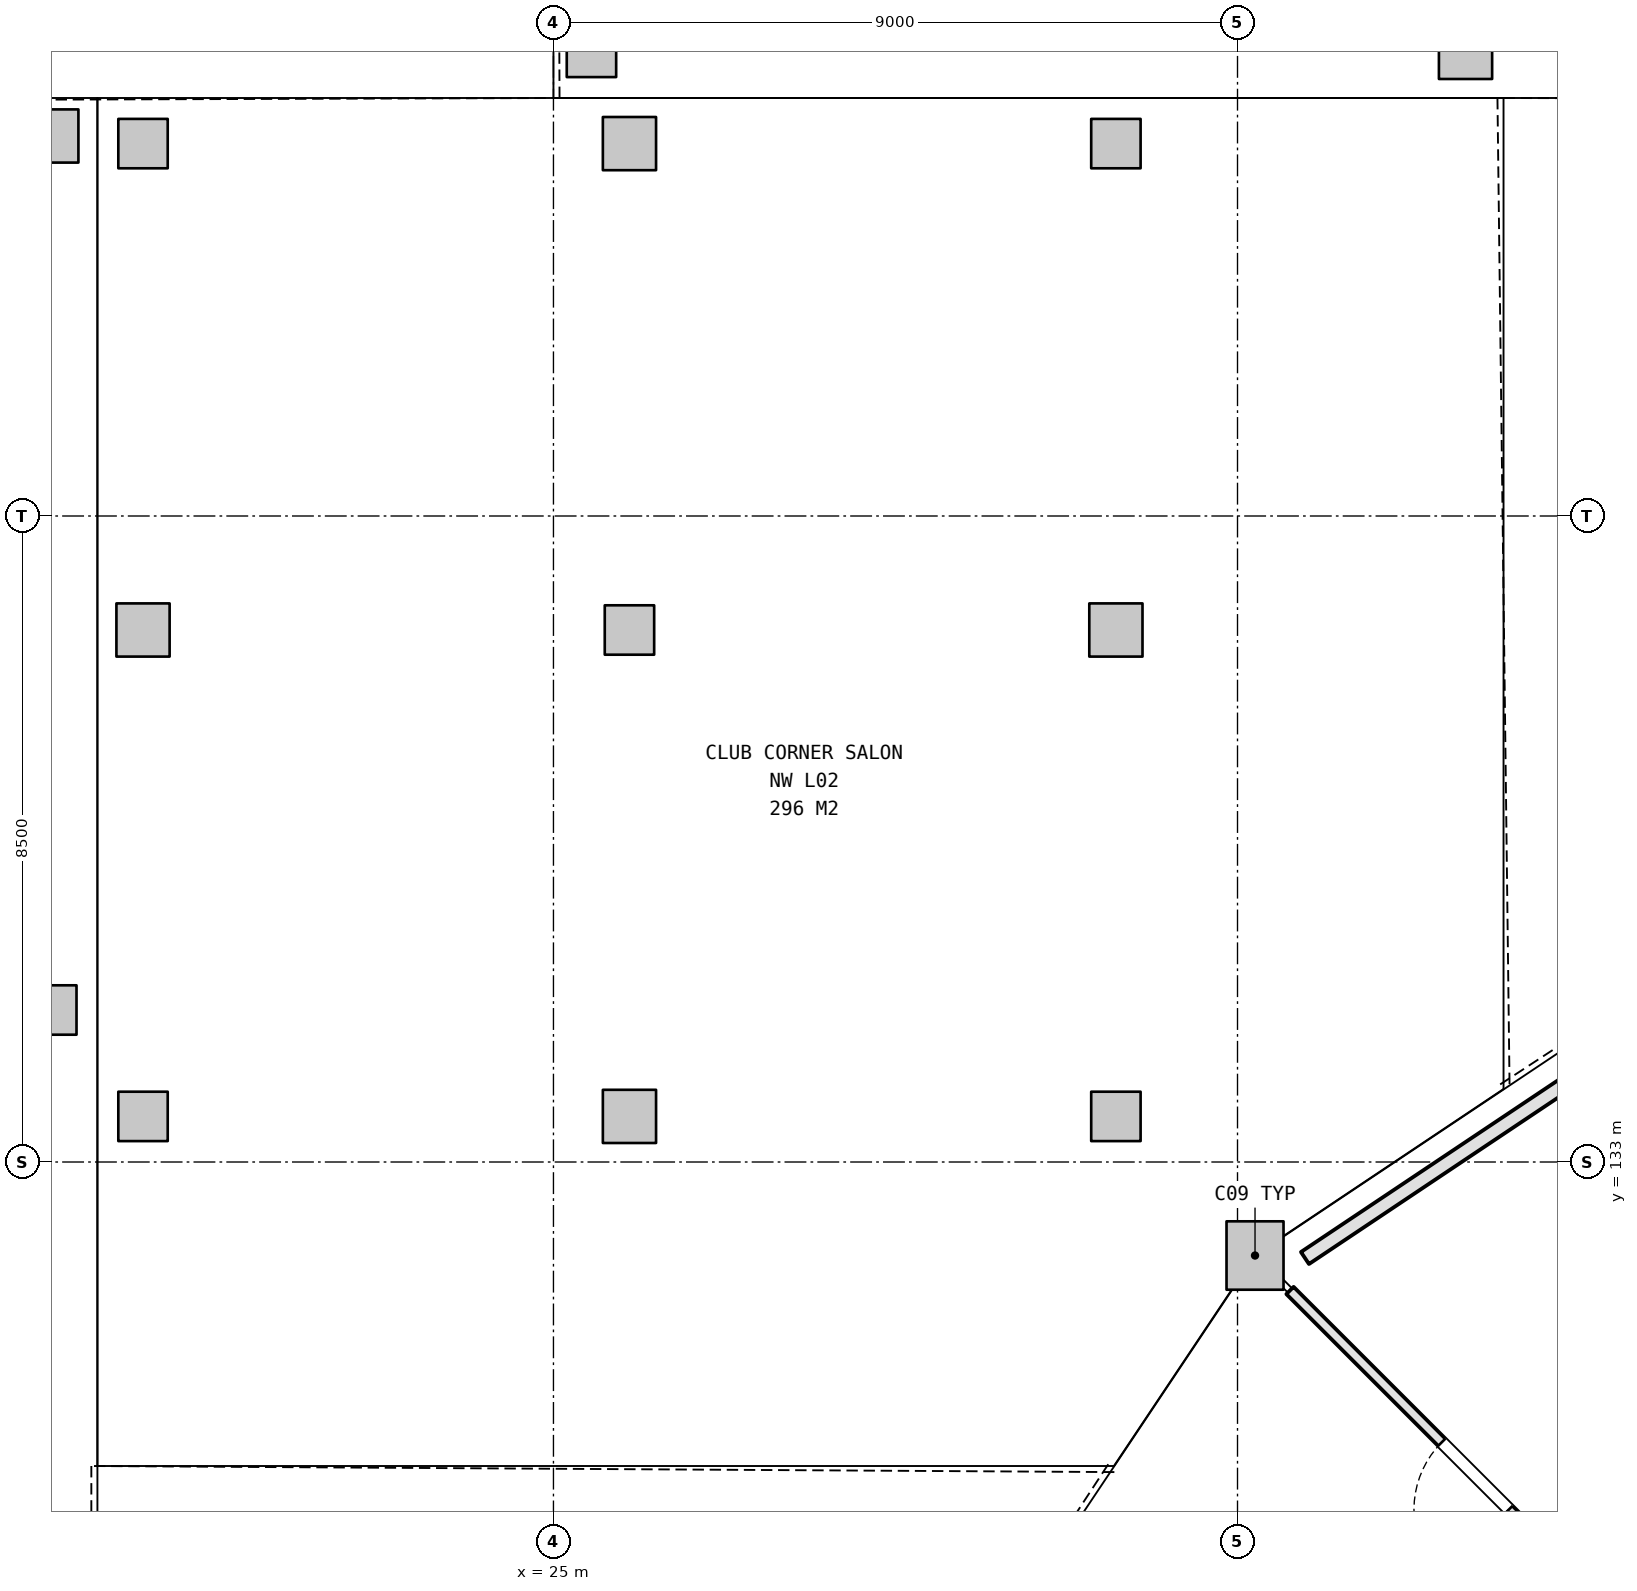
"""IFC4 building model, lengths in metres.
Left out: names, types, materials, properties, quantities, classifications, styles, units other than length and angle.
Written with IfcOpenShell. Run it as: python <this file> out.ifc"""

import sys

from ifc_helpers import new_model, si_unit, direction, frame, frame_2d, origin, origin_2d, place, context, subcontext, project, spatial, rectangle, extrude, element, fill, save


model = new_model("IFC4")
c1 = context("Model", 3, precision=1e-05, world=origin(), true_north=direction((0.0, 1.0)))
c2 = subcontext(c1, "Body", "Model", "MODEL_VIEW")
j1 = project(units=[si_unit("LENGTHUNIT", "METRE"), si_unit("PLANEANGLEUNIT", "RADIAN")], contexts=[c1])
p1 = place(None, origin())
s1 = spatial("IfcSite", under=j1, at=p1, CompositionType="ELEMENT")
p2 = place(p1, origin())
s2 = spatial("IfcBuilding", under=s1, at=p2, CompositionType="ELEMENT")
p3 = place(p2, frame((0.0, 0.0, 10.8)))
s3 = spatial("IfcBuildingStorey", under=s2, at=p3, CompositionType="ELEMENT", Elevation=10.8)
p4 = place(p3, frame((34.23, 131.77, 0.0), z_axis=(0.0, 0.0, 1.0), x_axis=(1.0, 0.0, 0.0)))
e1 = element("IfcColumn", 1, at=p4, inside=s3, PredefinedType="COLUMN", context=c2, shape_type="SweptSolid", body=[
    extrude(rectangle(XDim=0.75, YDim=0.9, at=origin_2d()), origin(), (0.0, 0.0, 1.0), 5.4),
])
p5 = place(p3, frame((18.4, 135.0, 0.0), z_axis=(0.0, 0.0, 1.0), x_axis=(1.0, 0.0, 0.0)))
e2 = element("IfcColumn", 2, at=p5, inside=s3, PredefinedType="COLUMN", context=c2, shape_type="SweptSolid", body=[
    extrude(rectangle(XDim=0.65, YDim=0.65, at=origin_2d()), origin(), (0.0, 0.0, 1.0), 5.4),
])
p6 = place(p3, frame((18.4, 146.5, 0.0), z_axis=(0.0, 0.0, 1.0), x_axis=(1.0, 0.0, 0.0)))
e3 = element("IfcColumn", 3, at=p6, inside=s3, PredefinedType="COLUMN", context=c2, shape_type="SweptSolid", body=[
    extrude(rectangle(XDim=0.7, YDim=0.7, at=origin_2d()), origin(), (0.0, 0.0, 1.0), 5.4),
])
p7 = place(p3, frame((25.5, 147.6, 0.0), z_axis=(0.0, 0.0, 1.0), x_axis=(1.0, 0.0, 0.0)))
e4 = element("IfcColumn", 4, at=p7, inside=s3, PredefinedType="COLUMN", context=c2, shape_type="SweptSolid", body=[
    extrude(rectangle(XDim=0.65, YDim=0.65, at=origin_2d()), origin(), (0.0, 0.0, 1.0), 5.4),
])
p8 = place(p3, frame((37.0, 147.6, 0.0), z_axis=(0.0, 0.0, 1.0), x_axis=(1.0, 0.0, 0.0)))
e5 = element("IfcColumn", 5, at=p8, inside=s3, PredefinedType="COLUMN", context=c2, shape_type="SweptSolid", body=[
    extrude(rectangle(XDim=0.7, YDim=0.7, at=origin_2d()), origin(), (0.0, 0.0, 1.0), 5.4),
])
p9 = place(p3, frame((19.6, 133.6, 0.0), z_axis=(0.0, 0.0, 1.0), x_axis=(1.0, 0.0, 0.0)))
e6 = element("IfcColumn", 6, at=p9, inside=s3, PredefinedType="COLUMN", context=c2, shape_type="SweptSolid", body=[
    extrude(rectangle(XDim=0.65, YDim=0.65, at=origin_2d()), origin(), (0.0, 0.0, 1.0), 5.4),
])
p10 = place(p3, frame((19.6, 140.0, 0.0), z_axis=(0.0, 0.0, 1.0), x_axis=(1.0, 0.0, 0.0)))
e7 = element("IfcColumn", 7, at=p10, inside=s3, PredefinedType="COLUMN", context=c2, shape_type="SweptSolid", body=[
    extrude(rectangle(XDim=0.7, YDim=0.7, at=origin_2d()), origin(), (0.0, 0.0, 1.0), 5.4),
])
p11 = place(p3, frame((19.6, 146.4, 0.0), z_axis=(0.0, 0.0, 1.0), x_axis=(1.0, 0.0, 0.0)))
e8 = element("IfcColumn", 8, at=p11, inside=s3, PredefinedType="COLUMN", context=c2, shape_type="SweptSolid", body=[
    extrude(rectangle(XDim=0.65, YDim=0.65, at=origin_2d()), origin(), (0.0, 0.0, 1.0), 5.4),
])
p12 = place(p3, frame((26.0, 133.6, 0.0), z_axis=(0.0, 0.0, 1.0), x_axis=(1.0, 0.0, 0.0)))
e9 = element("IfcColumn", 9, at=p12, inside=s3, PredefinedType="COLUMN", context=c2, shape_type="SweptSolid", body=[
    extrude(rectangle(XDim=0.7, YDim=0.7, at=origin_2d()), origin(), (0.0, 0.0, 1.0), 5.4),
])
p13 = place(p3, frame((26.0, 140.0, 0.0), z_axis=(0.0, 0.0, 1.0), x_axis=(1.0, 0.0, 0.0)))
e10 = element("IfcColumn", 10, at=p13, inside=s3, PredefinedType="COLUMN", context=c2, shape_type="SweptSolid", body=[
    extrude(rectangle(XDim=0.65, YDim=0.65, at=origin_2d()), origin(), (0.0, 0.0, 1.0), 5.4),
])
p14 = place(p3, frame((26.0, 146.4, 0.0), z_axis=(0.0, 0.0, 1.0), x_axis=(1.0, 0.0, 0.0)))
e11 = element("IfcColumn", 11, at=p14, inside=s3, PredefinedType="COLUMN", context=c2, shape_type="SweptSolid", body=[
    extrude(rectangle(XDim=0.7, YDim=0.7, at=origin_2d()), origin(), (0.0, 0.0, 1.0), 5.4),
])
p15 = place(p3, frame((32.4, 133.6, 0.0), z_axis=(0.0, 0.0, 1.0), x_axis=(1.0, 0.0, 0.0)))
e12 = element("IfcColumn", 12, at=p15, inside=s3, PredefinedType="COLUMN", context=c2, shape_type="SweptSolid", body=[
    extrude(rectangle(XDim=0.65, YDim=0.65, at=origin_2d()), origin(), (0.0, 0.0, 1.0), 5.4),
])
p16 = place(p3, frame((32.4, 140.0, 0.0), z_axis=(0.0, 0.0, 1.0), x_axis=(1.0, 0.0, 0.0)))
e13 = element("IfcColumn", 13, at=p16, inside=s3, PredefinedType="COLUMN", context=c2, shape_type="SweptSolid", body=[
    extrude(rectangle(XDim=0.7, YDim=0.7, at=origin_2d()), origin(), (0.0, 0.0, 1.0), 5.4),
])
p17 = place(p3, frame((32.4, 146.4, 0.0), z_axis=(0.0, 0.0, 1.0), x_axis=(1.0, 0.0, 0.0)))
e14 = element("IfcColumn", 14, at=p17, inside=s3, PredefinedType="COLUMN", context=c2, shape_type="SweptSolid", body=[
    extrude(rectangle(XDim=0.65, YDim=0.65, at=origin_2d()), origin(), (0.0, 0.0, 1.0), 5.4),
])
p18 = place(p3, frame((39.569, 126.431, 0.0), z_axis=(0.0, 0.0, 1.0), x_axis=(-0.707106781187, 0.707106781187, 0.0)))
e15 = element("IfcWall", 15, at=p18, inside=s3, PredefinedType="PARTITIONING", context=c2, shape_type="SweptSolid", body=[
    extrude(rectangle(XDim=6.9, YDim=0.135, at=frame_2d((3.45, 0.0))), origin(), (0.0, 0.0, 1.0), 4.215),
])
p19 = place(p18, frame((2.825, 0.0, 0.0)))
e16 = element("IfcOpeningElement", 16, at=p19, cuts=e15, PredefinedType="OPENING", context=c2, shape_type="SweptSolid", body=[
    extrude(rectangle(XDim=1.25, YDim=2.2, at=frame_2d((0.625, 1.1))), frame((0.0, 0.077, 0.0), z_axis=(0.0, -1.0, 0.0), x_axis=(1.0, 0.0, 0.0)), (0.0, 0.0, 1.0), 0.155),
])
p20 = place(p3, frame((34.887, 131.737, 0.0), z_axis=(0.0, 0.0, 1.0), x_axis=(0.831474480627, 0.555562946988, 0.0)))
e17 = element("IfcWall", 17, at=p20, inside=s3, PredefinedType="PARTITIONING", context=c2, shape_type="SweptSolid", body=[
    extrude(rectangle(XDim=19.192, YDim=0.19, at=frame_2d((9.596, 0.0))), origin(), (0.0, 0.0, 1.0), 5.12),
])
p21 = place(p19, origin())
e18 = element("IfcDoor", 18, at=p21, inside=s3, OperationType="SINGLE_SWING_LEFT", PredefinedType="DOOR", context=c2, shape_type="SweptSolid", body=[
    extrude(rectangle(XDim=1.25, YDim=2.2, at=frame_2d((0.625, 1.1))), frame((0.0, 0.025, 0.0), z_axis=(0.0, -1.0, 0.0), x_axis=(1.0, 0.0, 0.0)), (0.0, 0.0, 1.0), 0.05),
])
fill(e16, e18)
save(model, sys.argv[1])
